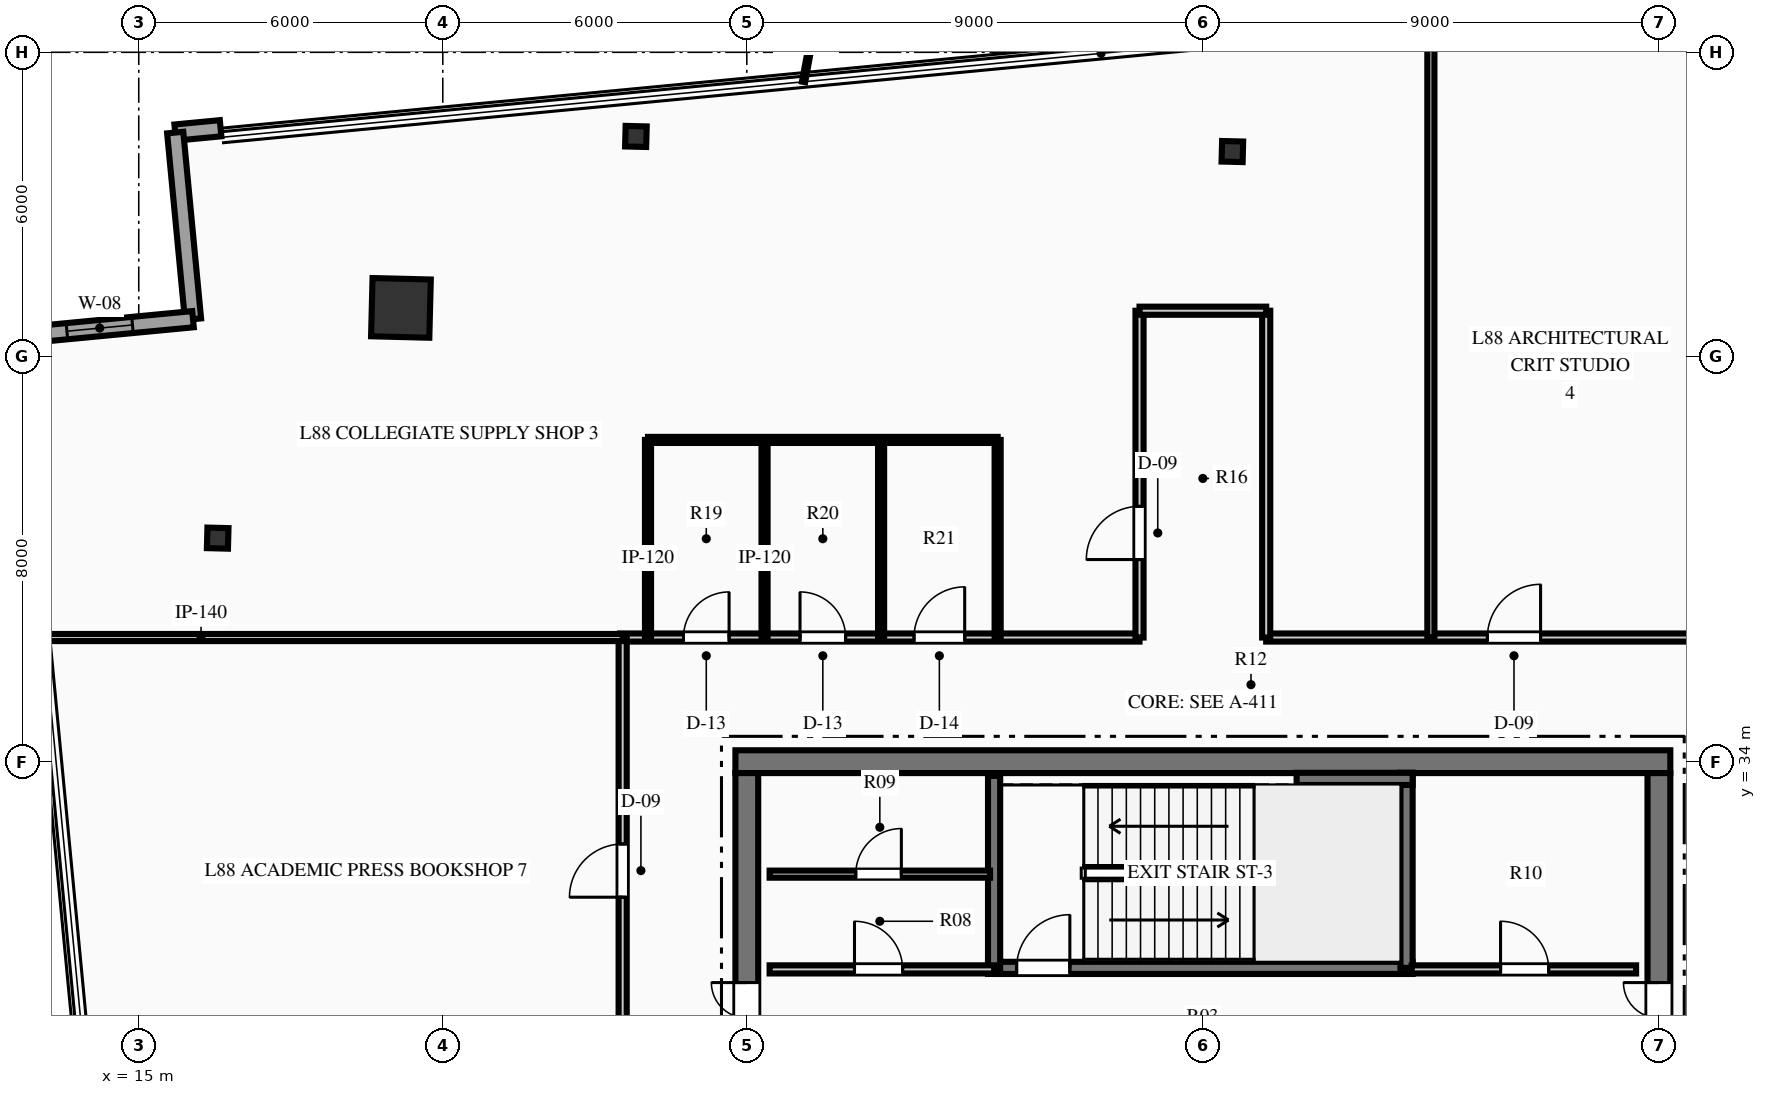
"""IFC4 building model, lengths in metres.
Left out: names, types, materials, properties, quantities, classifications, styles, units other than length and angle.
Written with IfcOpenShell. Run it as: python <this file> out.ifc"""

import sys

from ifc_helpers import new_model, si_unit, direction, frame, frame_2d, origin, origin_2d, place, context, subcontext, project, spatial, rectangle, hollow_rectangle, i_section, extrude, element, fill, save


model = new_model("IFC4")
c1 = context("Model", 3, precision=1e-05, world=origin(), true_north=direction((0.0, 1.0)))
c2 = subcontext(c1, "Body", "Model", "MODEL_VIEW")
j1 = project(units=[si_unit("LENGTHUNIT", "METRE"), si_unit("PLANEANGLEUNIT", "RADIAN")], contexts=[c1])
p1 = place(None, origin())
s1 = spatial("IfcSite", under=j1, at=p1, CompositionType="ELEMENT")
p2 = place(p1, origin())
s2 = spatial("IfcBuilding", under=s1, at=p2, CompositionType="ELEMENT")
p3 = place(p2, frame((0.0, 0.0, 347.7)))
s3 = spatial("IfcBuildingStorey", under=s2, at=p3, CompositionType="ELEMENT", Elevation=347.7)
p4 = place(p3, frame((26.775, 34.0, 0.0), z_axis=(0.0, 0.0, 1.0), x_axis=(1.0, 0.0, 0.0)))
e1 = element("IfcWall", 1, at=p4, inside=s3, PredefinedType="SHEAR", context=c2, shape_type="SweptSolid", body=[
    extrude(rectangle(XDim=18.45, YDim=0.45, at=frame_2d((9.225, 0.0))), origin(), (0.0, 0.0, 1.0), 4.5),
])
p5 = place(p3, frame((27.0, 18.225, 0.0), z_axis=(0.0, 0.0, 1.0), x_axis=(0.0, 1.0, 0.0)))
e2 = element("IfcWall", 2, at=p5, inside=s3, PredefinedType="SHEAR", context=c2, shape_type="SweptSolid", body=[
    extrude(rectangle(XDim=15.55, YDim=0.45, at=frame_2d((7.775, 0.0))), origin(), (0.0, 0.0, 1.0), 4.5),
])
p6 = place(p5, frame((10.015, 0.0, 0.0)))
e3 = element("IfcOpeningElement", 3, at=p6, cuts=e2, PredefinedType="OPENING", context=c2, shape_type="SweptSolid", body=[
    extrude(rectangle(XDim=1.4, YDim=2.2, at=frame_2d((0.7, 1.1))), frame((0.0, 0.235, 0.0), z_axis=(0.0, -1.0, 0.0), x_axis=(1.0, 0.0, 0.0)), (0.0, 0.0, 1.0), 0.47),
])
p7 = place(p3, frame((45.0, 18.225, 0.0), z_axis=(0.0, 0.0, 1.0), x_axis=(0.0, 1.0, 0.0)))
e4 = element("IfcWall", 4, at=p7, inside=s3, PredefinedType="SHEAR", context=c2, shape_type="SweptSolid", body=[
    extrude(rectangle(XDim=15.55, YDim=0.45, at=frame_2d((7.775, 0.0))), origin(), (0.0, 0.0, 1.0), 4.5),
])
p8 = place(p7, frame((10.015, 0.0, 0.0)))
e5 = element("IfcOpeningElement", 5, at=p8, cuts=e4, PredefinedType="OPENING", context=c2, shape_type="SweptSolid", body=[
    extrude(rectangle(XDim=1.4, YDim=2.2, at=frame_2d((0.7, 1.1))), frame((0.0, 0.235, 0.0), z_axis=(0.0, -1.0, 0.0), x_axis=(1.0, 0.0, 0.0)), (0.0, 0.0, 1.0), 0.47),
])
p9 = place(p3, frame((31.76, 29.93, 0.0), z_axis=(0.0, 0.0, 1.0), x_axis=(1.0, 0.0, 0.0)))
e6 = element("IfcWall", 6, at=p9, inside=s3, PredefinedType="SHEAR", context=c2, shape_type="SweptSolid", body=[
    extrude(rectangle(XDim=8.38, YDim=0.24, at=frame_2d((4.19, 0.0))), origin(), (0.0, 0.0, 1.0), 4.5),
])
p10 = place(p9, frame((0.565, 0.0, 0.0)))
e7 = element("IfcOpeningElement", 7, at=p10, cuts=e6, PredefinedType="OPENING", context=c2, shape_type="SweptSolid", body=[
    extrude(rectangle(XDim=1.05, YDim=2.15, at=frame_2d((0.525, 1.075))), frame((0.0, 0.13, 0.0), z_axis=(0.0, -1.0, 0.0), x_axis=(1.0, 0.0, 0.0)), (0.0, 0.0, 1.0), 0.26),
])
p11 = place(p3, frame((31.88, 29.93, 0.0), z_axis=(0.0, 0.0, 1.0), x_axis=(0.0, 1.0, 0.0)))
e8 = element("IfcWall", 8, at=p11, inside=s3, PredefinedType="SHEAR", context=c2, shape_type="SweptSolid", body=[
    extrude(rectangle(XDim=3.79, YDim=0.24, at=frame_2d((1.895, 0.0))), origin(), (0.0, 0.0, 1.0), 4.5),
])
p12 = place(p3, frame((40.02, 29.93, 0.0), z_axis=(0.0, 0.0, 1.0), x_axis=(0.0, 1.0, 0.0)))
e9 = element("IfcWall", 9, at=p12, inside=s3, PredefinedType="SHEAR", context=c2, shape_type="SweptSolid", body=[
    extrude(rectangle(XDim=3.85, YDim=0.24, at=frame_2d((1.925, 0.0))), origin(), (0.0, 0.0, 1.0), 4.5),
])
p13 = place(p3, frame((37.85, 33.66, 0.0), z_axis=(0.0, 0.0, 1.0), x_axis=(1.0, 0.0, 0.0)))
e10 = element("IfcWall", 10, at=p13, inside=s3, PredefinedType="SHEAR", context=c2, shape_type="SweptSolid", body=[
    extrude(rectangle(XDim=2.29, YDim=0.24, at=frame_2d((1.145, 0.0))), origin(), (0.0, 0.0, 1.0), 4.5),
])
p14 = place(p3, frame((20.174, 42.956, 0.0), z_axis=(0.0, 0.0, 1.0), x_axis=(0.025304572866, 0.999679788028, 0.0)))
e11 = element("IfcColumn", 11, at=p14, inside=s3, PredefinedType="COLUMN", context=c2, shape_type="SweptSolid", body=[
    extrude(hollow_rectangle(XDim=1.15, YDim=1.15, WallThickness=0.05, at=origin_2d()), origin(), (0.0, 0.0, 1.0), 4.5),
])
for number, where, z_axis, x_axis in (
    (12, (36.582, 46.042, 0.0), (0.0, 0.0, 1.0), (0.025, 1.0, 0.0)),
    (13, (24.811, 46.34, 0.0), (0.0, 0.0, 1.0), (0.025, 1.0, 0.0)),
    (14, (16.558, 38.412, 0.0), (0.0, 0.0, 1.0), (0.025, 1.0, 0.0)),
):
    element("IfcColumn", number, at=place(p3, frame(where, z_axis=z_axis, x_axis=x_axis)), inside=s3, PredefinedType="COLUMN", context=c2, shape_type="SweptSolid", body=[
        extrude(i_section(OverallWidth=0.406, OverallDepth=0.416, WebThickness=0.03, FlangeThickness=0.048, at=origin_2d()), origin(), (0.0, 0.0, 1.0), 4.5),
    ])
p15 = place(p3, frame((15.719, 46.416, 0.0), z_axis=(0.0, 0.0, 1.0), x_axis=(0.995457602511, 0.095205890594, 0.0)))
e15 = element("IfcWall", 15, at=p15, inside=s3, PredefinedType="STANDARD", context=c2, shape_type="SweptSolid", body=[
    extrude(rectangle(XDim=0.9, YDim=0.32, at=frame_2d((0.45, 0.0))), origin(), (0.0, 0.0, 1.0), 4.1),
])
p16 = place(p3, frame((16.071, 42.733, 0.0), z_axis=(0.0, 0.0, 1.0), x_axis=(-0.095020841047, 0.995475283353, 0.0)))
e16 = element("IfcWall", 16, at=p16, inside=s3, PredefinedType="STANDARD", context=c2, shape_type="SweptSolid", body=[
    extrude(rectangle(XDim=3.7, YDim=0.32, at=frame_2d((1.85, 0.0))), origin(), (0.0, 0.0, 1.0), 4.1),
])
p17 = place(p3, frame((12.387, 42.381, 0.0), z_axis=(0.0, 0.0, 1.0), x_axis=(0.995475879086, 0.095014599714, 0.0)))
e17 = element("IfcWall", 17, at=p17, inside=s3, PredefinedType="STANDARD", context=c2, shape_type="SweptSolid", body=[
    extrude(rectangle(XDim=3.7, YDim=0.32, at=frame_2d((1.85, 0.0))), origin(), (0.0, 0.0, 1.0), 4.1),
])
p18 = place(p17, frame((1.2, 0.0, 0.85)))
e18 = element("IfcOpeningElement", 18, at=p18, cuts=e17, PredefinedType="OPENING", context=c2, shape_type="SweptSolid", body=[
    extrude(rectangle(XDim=1.3, YDim=1.9, at=frame_2d((0.65, 0.95))), frame((0.0, 0.17, 0.0), z_axis=(0.0, -1.0, 0.0), x_axis=(1.0, 0.0, 0.0)), (0.0, 0.0, 1.0), 0.34),
])
p19 = place(p3, frame((27.45, 29.9, 0.0), z_axis=(0.0, 0.0, 1.0), x_axis=(1.0, 0.0, 0.0)))
e19 = element("IfcWall", 19, at=p19, inside=s3, PredefinedType="PARTITIONING", context=c2, shape_type="SweptSolid", body=[
    extrude(rectangle(XDim=4.43, YDim=0.16, at=frame_2d((2.215, 0.0))), origin(), (0.0, 0.0, 1.0), 4.1),
])
p20 = place(p19, frame((1.675, 0.0, 0.0)))
e20 = element("IfcOpeningElement", 20, at=p20, cuts=e19, PredefinedType="OPENING", context=c2, shape_type="SweptSolid", body=[
    extrude(rectangle(XDim=0.95, YDim=2.15, at=frame_2d((0.475, 1.075))), frame((0.0, 0.09, 0.0), z_axis=(0.0, -1.0, 0.0), x_axis=(1.0, 0.0, 0.0)), (0.0, 0.0, 1.0), 0.18),
])
p21 = place(p3, frame((27.45, 31.78, 0.0), z_axis=(0.0, 0.0, 1.0), x_axis=(1.0, 0.0, 0.0)))
e21 = element("IfcWall", 21, at=p21, inside=s3, PredefinedType="PARTITIONING", context=c2, shape_type="SweptSolid", body=[
    extrude(rectangle(XDim=4.35, YDim=0.14, at=frame_2d((2.175, 0.0))), origin(), (0.0, 0.0, 1.0), 4.1),
])
p22 = place(p21, frame((1.7, 0.0, 0.0)))
e22 = element("IfcOpeningElement", 22, at=p22, cuts=e21, PredefinedType="OPENING", context=c2, shape_type="SweptSolid", body=[
    extrude(rectangle(XDim=0.9, YDim=2.15, at=frame_2d((0.45, 1.075))), frame((0.0, 0.08, 0.0), z_axis=(0.0, -1.0, 0.0), x_axis=(1.0, 0.0, 0.0)), (0.0, 0.0, 1.0), 0.16),
])
p23 = place(p3, frame((40.12, 29.9, 0.0), z_axis=(0.0, 0.0, 1.0), x_axis=(1.0, 0.0, 0.0)))
e23 = element("IfcWall", 23, at=p23, inside=s3, PredefinedType="PARTITIONING", context=c2, shape_type="SweptSolid", body=[
    extrude(rectangle(XDim=4.43, YDim=0.16, at=frame_2d((2.215, 0.0))), origin(), (0.0, 0.0, 1.0), 4.1),
])
p24 = place(p23, frame((1.755, 0.0, 0.0)))
e24 = element("IfcOpeningElement", 24, at=p24, cuts=e23, PredefinedType="OPENING", context=c2, shape_type="SweptSolid", body=[
    extrude(rectangle(XDim=0.95, YDim=2.15, at=frame_2d((0.475, 1.075))), frame((0.0, 0.09, 0.0), z_axis=(0.0, -1.0, 0.0), x_axis=(1.0, 0.0, 0.0)), (0.0, 0.0, 1.0), 0.18),
])
p25 = place(p3, frame((24.5, 36.45, 0.0), z_axis=(0.0, 0.0, 1.0), x_axis=(1.0, 0.0, 0.0)))
e25 = element("IfcWall", 25, at=p25, inside=s3, PredefinedType="PARTITIONING", context=c2, shape_type="SweptSolid", body=[
    extrude(rectangle(XDim=10.25, YDim=0.16, at=frame_2d((5.125, 0.0))), origin(), (0.0, 0.0, 1.0), 4.1),
])
p26 = place(p25, frame((1.25, 0.0, 0.0)))
e26 = element("IfcOpeningElement", 26, at=p26, cuts=e25, PredefinedType="OPENING", context=c2, shape_type="SweptSolid", body=[
    extrude(rectangle(XDim=0.9, YDim=2.15, at=frame_2d((0.45, 1.075))), frame((0.0, 0.09, 0.0), z_axis=(0.0, -1.0, 0.0), x_axis=(1.0, 0.0, 0.0)), (0.0, 0.0, 1.0), 0.18),
])
p27 = place(p25, frame((3.55, 0.0, 0.0)))
e27 = element("IfcOpeningElement", 27, at=p27, cuts=e25, PredefinedType="OPENING", context=c2, shape_type="SweptSolid", body=[
    extrude(rectangle(XDim=0.9, YDim=2.15, at=frame_2d((0.45, 1.075))), frame((0.0, 0.09, 0.0), z_axis=(0.0, -1.0, 0.0), x_axis=(1.0, 0.0, 0.0)), (0.0, 0.0, 1.0), 0.18),
])
p28 = place(p25, frame((5.8, 0.0, 0.0)))
e28 = element("IfcOpeningElement", 28, at=p28, cuts=e25, PredefinedType="OPENING", context=c2, shape_type="SweptSolid", body=[
    extrude(rectangle(XDim=1.0, YDim=2.15, at=frame_2d((0.5, 1.075))), frame((0.0, 0.09, 0.0), z_axis=(0.0, -1.0, 0.0), x_axis=(1.0, 0.0, 0.0)), (0.0, 0.0, 1.0), 0.18),
])
p29 = place(p3, frame((37.25, 36.45, 0.0), z_axis=(0.0, 0.0, 1.0), x_axis=(1.0, 0.0, 0.0)))
e29 = element("IfcWall", 29, at=p29, inside=s3, PredefinedType="PARTITIONING", context=c2, shape_type="SweptSolid", body=[
    extrude(rectangle(XDim=10.25, YDim=0.16, at=frame_2d((5.125, 0.0))), origin(), (0.0, 0.0, 1.0), 4.1),
])
p30 = place(p29, frame((4.365, 0.0, 0.0)))
e30 = element("IfcOpeningElement", 30, at=p30, cuts=e29, PredefinedType="OPENING", context=c2, shape_type="SweptSolid", body=[
    extrude(rectangle(XDim=1.05, YDim=2.15, at=frame_2d((0.525, 1.075))), frame((0.0, 0.09, 0.0), z_axis=(0.0, -1.0, 0.0), x_axis=(1.0, 0.0, 0.0)), (0.0, 0.0, 1.0), 0.18),
])
p31 = place(p29, frame((8.925, 0.0, 0.0)))
e31 = element("IfcOpeningElement", 31, at=p31, cuts=e29, PredefinedType="OPENING", context=c2, shape_type="SweptSolid", body=[
    extrude(rectangle(XDim=0.9, YDim=2.15, at=frame_2d((0.45, 1.075))), frame((0.0, 0.09, 0.0), z_axis=(0.0, -1.0, 0.0), x_axis=(1.0, 0.0, 0.0)), (0.0, 0.0, 1.0), 0.18),
])
p32 = place(p3, frame((24.55, 27.25, 0.0), z_axis=(0.0, 0.0, 1.0), x_axis=(0.0, 1.0, 0.0)))
e32 = element("IfcWall", 32, at=p32, inside=s3, PredefinedType="PARTITIONING", context=c2, shape_type="SweptSolid", body=[
    extrude(rectangle(XDim=9.2, YDim=0.16, at=frame_2d((4.6, 0.0))), origin(), (0.0, 0.0, 1.0), 4.1),
])
p33 = place(p32, frame((4.075, 0.0, 0.0)))
e33 = element("IfcOpeningElement", 33, at=p33, cuts=e32, PredefinedType="OPENING", context=c2, shape_type="SweptSolid", body=[
    extrude(rectangle(XDim=1.05, YDim=2.15, at=frame_2d((0.525, 1.075))), frame((0.0, 0.09, 0.0), z_axis=(0.0, -1.0, 0.0), x_axis=(1.0, 0.0, 0.0)), (0.0, 0.0, 1.0), 0.18),
])
p34 = place(p3, frame((34.75, 36.45, 0.0), z_axis=(0.0, 0.0, 1.0), x_axis=(0.0, 1.0, 0.0)))
e34 = element("IfcWall", 34, at=p34, inside=s3, PredefinedType="PARTITIONING", context=c2, shape_type="SweptSolid", body=[
    extrude(rectangle(XDim=6.45, YDim=0.16, at=frame_2d((3.225, 0.0))), origin(), (0.0, 0.0, 1.0), 4.1),
])
p35 = place(p34, frame((1.539, 0.0, 0.0)))
e35 = element("IfcOpeningElement", 35, at=p35, cuts=e34, PredefinedType="OPENING", context=c2, shape_type="SweptSolid", body=[
    extrude(rectangle(XDim=1.05, YDim=2.15, at=frame_2d((0.525, 1.075))), frame((0.0, 0.09, 0.0), z_axis=(0.0, -1.0, 0.0), x_axis=(1.0, 0.0, 0.0)), (0.0, 0.0, 1.0), 0.18),
])
p36 = place(p3, frame((37.25, 36.45, 0.0), z_axis=(0.0, 0.0, 1.0), x_axis=(0.0, 1.0, 0.0)))
e36 = element("IfcWall", 36, at=p36, inside=s3, PredefinedType="PARTITIONING", context=c2, shape_type="SweptSolid", body=[
    extrude(rectangle(XDim=6.45, YDim=0.16, at=frame_2d((3.225, 0.0))), origin(), (0.0, 0.0, 1.0), 4.1),
])
p37 = place(p3, frame((34.75, 42.9, 0.0), z_axis=(0.0, 0.0, 1.0), x_axis=(1.0, 0.0, 0.0)))
e37 = element("IfcWall", 37, at=p37, inside=s3, PredefinedType="PARTITIONING", context=c2, shape_type="SweptSolid", body=[
    extrude(rectangle(XDim=2.5, YDim=0.16, at=frame_2d((1.25, 0.0))), origin(), (0.0, 0.0, 1.0), 4.1),
])
for number, where, z_axis, x_axis in (
    (38, (25.05, 36.45, 0.0), (0.0, 0.0, 1.0), (0.0, 1.0, 0.0)),
    (39, (27.35, 36.45, 0.0), (0.0, 0.0, 1.0), (0.0, 1.0, 0.0)),
    (40, (29.65, 36.45, 0.0), (0.0, 0.0, 1.0), (0.0, 1.0, 0.0)),
    (41, (31.95, 36.45, 0.0), (0.0, 0.0, 1.0), (0.0, 1.0, 0.0)),
):
    element("IfcWall", number, at=place(p3, frame(where, z_axis=z_axis, x_axis=x_axis)), inside=s3, PredefinedType="PARTITIONING", context=c2, shape_type="SweptSolid", body=[
        extrude(rectangle(XDim=3.9, YDim=0.12, at=frame_2d((1.95, 0.0))), origin(), (0.0, 0.0, 1.0), 4.1),
    ])
p38 = place(p3, frame((25.05, 40.35, 0.0), z_axis=(0.0, 0.0, 1.0), x_axis=(1.0, 0.0, 0.0)))
e42 = element("IfcWall", 42, at=p38, inside=s3, PredefinedType="PARTITIONING", context=c2, shape_type="SweptSolid", body=[
    extrude(rectangle(XDim=6.9, YDim=0.12, at=frame_2d((3.45, 0.0))), origin(), (0.0, 0.0, 1.0), 4.1),
])
p39 = place(p3, frame((12.993, 36.45, 0.0), z_axis=(0.0, 0.0, 1.0), x_axis=(1.0, 0.0, 0.0)))
e43 = element("IfcWall", 43, at=p39, inside=s3, PredefinedType="PARTITIONING", context=c2, shape_type="SweptSolid", body=[
    extrude(rectangle(XDim=11.557, YDim=0.14, at=frame_2d((5.778, 0.0))), origin(), (0.0, 0.0, 1.0), 3.689),
])
p40 = place(p3, frame((40.5, 36.45, 0.0), z_axis=(0.0, 0.0, 1.0), x_axis=(0.0, 1.0, 0.0)))
e44 = element("IfcWall", 44, at=p40, inside=s3, PredefinedType="PARTITIONING", context=c2, shape_type="SweptSolid", body=[
    extrude(rectangle(XDim=12.29, YDim=0.14, at=frame_2d((6.145, 0.0))), origin(), (0.0, 0.0, 1.0), 4.1),
])
p41 = place(p18, origin())
e45 = element("IfcWindow", 45, at=p41, inside=s3, PartitioningType="SINGLE_PANEL", PredefinedType="WINDOW", context=c2, shape_type="SweptSolid", body=[
    extrude(rectangle(XDim=1.3, YDim=1.9, at=frame_2d((0.65, 0.95))), frame((0.0, 0.03, 0.0), z_axis=(0.0, -1.0, 0.0), x_axis=(1.0, 0.0, 0.0)), (0.0, 0.0, 1.0), 0.06),
])
fill(e18, e45)
p42 = place(p20, origin())
e46 = element("IfcDoor", 46, at=p42, inside=s3, OperationType="SINGLE_SWING_LEFT", PredefinedType="DOOR", context=c2, shape_type="SweptSolid", body=[
    extrude(rectangle(XDim=0.95, YDim=2.15, at=frame_2d((0.475, 1.075))), frame((0.0, 0.025, 0.0), z_axis=(0.0, -1.0, 0.0), x_axis=(1.0, 0.0, 0.0)), (0.0, 0.0, 1.0), 0.05),
])
fill(e20, e46)
p43 = place(p22, origin())
e47 = element("IfcDoor", 47, at=p43, inside=s3, OperationType="SINGLE_SWING_RIGHT", PredefinedType="DOOR", context=c2, shape_type="SweptSolid", body=[
    extrude(rectangle(XDim=0.9, YDim=2.15, at=frame_2d((0.45, 1.075))), frame((0.0, 0.025, 0.0), z_axis=(0.0, -1.0, 0.0), x_axis=(1.0, 0.0, 0.0)), (0.0, 0.0, 1.0), 0.05),
])
fill(e22, e47)
p44 = place(p24, origin())
e48 = element("IfcDoor", 48, at=p44, inside=s3, OperationType="SINGLE_SWING_LEFT", PredefinedType="DOOR", context=c2, shape_type="SweptSolid", body=[
    extrude(rectangle(XDim=0.95, YDim=2.15, at=frame_2d((0.475, 1.075))), frame((0.0, 0.025, 0.0), z_axis=(0.0, -1.0, 0.0), x_axis=(1.0, 0.0, 0.0)), (0.0, 0.0, 1.0), 0.05),
])
fill(e24, e48)
p45 = place(p10, origin())
e49 = element("IfcDoor", 49, at=p45, inside=s3, OperationType="SINGLE_SWING_RIGHT", PredefinedType="DOOR", context=c2, shape_type="SweptSolid", body=[
    extrude(rectangle(XDim=1.05, YDim=2.15, at=frame_2d((0.525, 1.075))), frame((0.0, 0.025, 0.0), z_axis=(0.0, -1.0, 0.0), x_axis=(1.0, 0.0, 0.0)), (0.0, 0.0, 1.0), 0.05),
])
fill(e7, e49)
p46 = place(p6, origin())
e50 = element("IfcDoor", 50, at=p46, inside=s3, OperationType="DOUBLE_DOOR_SINGLE_SWING", PredefinedType="DOOR", context=c2, shape_type="SweptSolid", body=[
    extrude(rectangle(XDim=1.4, YDim=2.2, at=frame_2d((0.7, 1.1))), frame((0.0, 0.025, 0.0), z_axis=(0.0, -1.0, 0.0), x_axis=(1.0, 0.0, 0.0)), (0.0, 0.0, 1.0), 0.05),
])
fill(e3, e50)
p47 = place(p8, origin())
e51 = element("IfcDoor", 51, at=p47, inside=s3, OperationType="DOUBLE_DOOR_SINGLE_SWING", PredefinedType="DOOR", context=c2, shape_type="SweptSolid", body=[
    extrude(rectangle(XDim=1.4, YDim=2.2, at=frame_2d((0.7, 1.1))), frame((0.0, 0.025, 0.0), z_axis=(0.0, -1.0, 0.0), x_axis=(1.0, 0.0, 0.0)), (0.0, 0.0, 1.0), 0.05),
])
fill(e5, e51)
p48 = place(p26, origin())
e52 = element("IfcDoor", 52, at=p48, inside=s3, OperationType="SINGLE_SWING_RIGHT", PredefinedType="DOOR", context=c2, shape_type="SweptSolid", body=[
    extrude(rectangle(XDim=0.9, YDim=2.15, at=frame_2d((0.45, 1.075))), frame((0.0, 0.025, 0.0), z_axis=(0.0, -1.0, 0.0), x_axis=(1.0, 0.0, 0.0)), (0.0, 0.0, 1.0), 0.05),
])
fill(e26, e52)
p49 = place(p27, origin())
e53 = element("IfcDoor", 53, at=p49, inside=s3, OperationType="SINGLE_SWING_LEFT", PredefinedType="DOOR", context=c2, shape_type="SweptSolid", body=[
    extrude(rectangle(XDim=0.9, YDim=2.15, at=frame_2d((0.45, 1.075))), frame((0.0, 0.025, 0.0), z_axis=(0.0, -1.0, 0.0), x_axis=(1.0, 0.0, 0.0)), (0.0, 0.0, 1.0), 0.05),
])
fill(e27, e53)
p50 = place(p28, origin())
e54 = element("IfcDoor", 54, at=p50, inside=s3, OperationType="SINGLE_SWING_RIGHT", PredefinedType="DOOR", context=c2, shape_type="SweptSolid", body=[
    extrude(rectangle(XDim=1.0, YDim=2.15, at=frame_2d((0.5, 1.075))), frame((0.0, 0.025, 0.0), z_axis=(0.0, -1.0, 0.0), x_axis=(1.0, 0.0, 0.0)), (0.0, 0.0, 1.0), 0.05),
])
fill(e28, e54)
p51 = place(p35, origin())
e55 = element("IfcDoor", 55, at=p51, inside=s3, OperationType="SINGLE_SWING_LEFT", PredefinedType="DOOR", context=c2, shape_type="SweptSolid", body=[
    extrude(rectangle(XDim=1.05, YDim=2.15, at=frame_2d((0.525, 1.075))), frame((0.0, 0.025, 0.0), z_axis=(0.0, -1.0, 0.0), x_axis=(1.0, 0.0, 0.0)), (0.0, 0.0, 1.0), 0.05),
])
fill(e35, e55)
p52 = place(p30, origin())
e56 = element("IfcDoor", 56, at=p52, inside=s3, OperationType="SINGLE_SWING_RIGHT", PredefinedType="DOOR", context=c2, shape_type="SweptSolid", body=[
    extrude(rectangle(XDim=1.05, YDim=2.15, at=frame_2d((0.525, 1.075))), frame((0.0, 0.025, 0.0), z_axis=(0.0, -1.0, 0.0), x_axis=(1.0, 0.0, 0.0)), (0.0, 0.0, 1.0), 0.05),
])
fill(e30, e56)
p53 = place(p33, origin())
e57 = element("IfcDoor", 57, at=p53, inside=s3, OperationType="SINGLE_SWING_LEFT", PredefinedType="DOOR", context=c2, shape_type="SweptSolid", body=[
    extrude(rectangle(XDim=1.05, YDim=2.15, at=frame_2d((0.525, 1.075))), frame((0.0, 0.025, 0.0), z_axis=(0.0, -1.0, 0.0), x_axis=(1.0, 0.0, 0.0)), (0.0, 0.0, 1.0), 0.05),
])
fill(e33, e57)
save(model, sys.argv[1])
